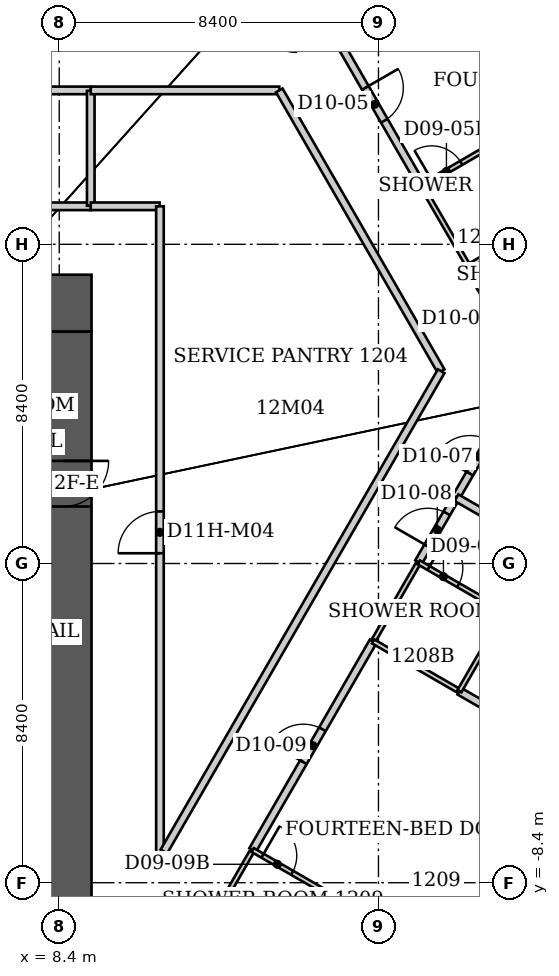
"""IFC4 building model, lengths in metres.
Left out: names, types, materials, properties, quantities, classifications, styles, units other than length and angle.
Written with IfcOpenShell. Run it as: python <this file> out.ifc"""

import sys

from ifc_helpers import new_model, si_unit, direction, frame, frame_2d, origin, origin_2d, place, context, subcontext, project, spatial, rectangle, extrude, clip, halfspace, element, fill, save


model = new_model("IFC4")
c1 = context("Model", 3, precision=1e-05, world=origin(), true_north=direction((0.0, 1.0)))
c2 = subcontext(c1, "Body", "Model", "MODEL_VIEW")
j1 = project(units=[si_unit("LENGTHUNIT", "METRE"), si_unit("PLANEANGLEUNIT", "RADIAN")], contexts=[c1])
p1 = place(None, origin())
s1 = spatial("IfcSite", under=j1, at=p1, CompositionType="ELEMENT")
p2 = place(p1, origin())
s2 = spatial("IfcBuilding", under=s1, at=p2, CompositionType="ELEMENT")
p3 = place(p2, frame((0.0, 0.0, 53.4)))
s3 = spatial("IfcBuildingStorey", under=s2, at=p3, CompositionType="ELEMENT", Elevation=53.4)
p4 = place(p3, frame((20.701, -9.521, 0.0), z_axis=(0.0, 0.0, 1.0), x_axis=(0.866025403784, -0.5, 0.0)))
e1 = element("IfcColumn", 1, at=p4, inside=s3, PredefinedType="COLUMN", context=c2, shape_type="SweptSolid", body=[
    clip(extrude(rectangle(XDim=2.4, YDim=2.4, at=origin_2d()), origin(), (0.0, 0.0, 1.0), 3.752), halfspace(frame((0.0, 0.0, 3.64)), False)),
])
p5 = place(p3, frame((-9.25, 6.85, 0.0), z_axis=(0.0, 0.0, 1.0), x_axis=(1.0, 0.0, 0.0)))
e2 = element("IfcWall", 2, at=p5, inside=s3, PredefinedType="SHEAR", context=c2, shape_type="SweptSolid", body=[
    extrude(rectangle(XDim=18.5, YDim=1.5, at=frame_2d((9.25, 0.0))), origin(), (0.0, 0.0, 1.0), 3.8),
])
p6 = place(p3, frame((8.5, -9.2, 0.0), z_axis=(0.0, 0.0, 1.0), x_axis=(0.0, 1.0, 0.0)))
e3 = element("IfcWall", 3, at=p6, inside=s3, PredefinedType="SHEAR", context=c2, shape_type="SweptSolid", body=[
    extrude(rectangle(XDim=15.3, YDim=1.5, at=frame_2d((7.65, 0.0))), origin(), (0.0, 0.0, 1.0), 3.8),
])
p7 = place(p6, frame((10.7, 0.0, 0.0)))
e4 = element("IfcOpeningElement", 4, at=p7, cuts=e3, PredefinedType="OPENING", context=c2, shape_type="SweptSolid", body=[
    extrude(rectangle(XDim=1.2, YDim=2.2, at=frame_2d((0.6, 1.1))), frame((0.0, 0.75, 0.0), z_axis=(0.0, -1.0, 0.0), x_axis=(1.0, 0.0, 0.0)), (0.0, 0.0, 1.0), 1.5),
])
p8 = place(p3, frame((0.0, 12.45, 0.0), z_axis=(0.0, 0.0, 1.0), x_axis=(1.0, 0.0, 0.0)))
e5 = element("IfcWall", 5, at=p8, inside=s3, PredefinedType="PARTITIONING", context=c2, shape_type="SweptSolid", body=[
    extrude(rectangle(XDim=9.23, YDim=0.2, at=frame_2d((4.615, 0.0))), origin(), (0.0, 0.0, 1.0), 3.64),
])
p9 = place(p8, frame((4.065, 0.0, 0.0)))
e6 = element("IfcOpeningElement", 6, at=p9, cuts=e5, PredefinedType="OPENING", context=c2, shape_type="SweptSolid", body=[
    extrude(rectangle(XDim=1.1, YDim=2.2, at=frame_2d((0.55, 1.1))), frame((0.0, 0.1, 0.0), z_axis=(0.0, -1.0, 0.0), x_axis=(1.0, 0.0, 0.0)), (0.0, 0.0, 1.0), 0.2),
])
p10 = place(p3, frame((9.23, 9.4, 0.0), z_axis=(0.0, 0.0, 1.0), x_axis=(-1.0, 0.0, 0.0)))
e7 = element("IfcWall", 7, at=p10, inside=s3, PredefinedType="PARTITIONING", context=c2, shape_type="SweptSolid", body=[
    extrude(rectangle(XDim=9.23, YDim=0.2, at=frame_2d((4.615, 0.0))), origin(), (0.0, 0.0, 1.0), 3.64),
])
p11 = place(p3, frame((9.23, 12.44, 0.0), z_axis=(0.0, 0.0, 1.0), x_axis=(0.0, -1.0, 0.0)))
e8 = element("IfcWall", 8, at=p11, inside=s3, PredefinedType="PARTITIONING", context=c2, shape_type="SweptSolid", body=[
    extrude(rectangle(XDim=3.025, YDim=0.2, at=frame_2d((1.512, 0.0))), origin(), (0.0, 0.0, 1.0), 3.64),
])
p12 = place(p3, frame((9.23, 12.45, 0.0), z_axis=(0.0, 0.0, 1.0), x_axis=(1.0, 0.0, 0.0)))
e9 = element("IfcWall", 9, at=p12, inside=s3, PredefinedType="PARTITIONING", context=c2, shape_type="SweptSolid", body=[
    extrude(rectangle(XDim=4.96, YDim=0.2, at=frame_2d((2.48, 0.0))), origin(), (0.0, 0.0, 1.0), 3.64),
])
p13 = place(p3, frame((11.04, 9.4, 0.0), z_axis=(0.0, 0.0, 1.0), x_axis=(-1.0, 0.0, 0.0)))
e10 = element("IfcWall", 10, at=p13, inside=s3, PredefinedType="PARTITIONING", context=c2, shape_type="SweptSolid", body=[
    extrude(rectangle(XDim=1.81, YDim=0.2, at=frame_2d((0.905, 0.0))), origin(), (0.0, 0.0, 1.0), 3.64),
])
p14 = place(p3, frame((11.05, -7.76, 0.0), z_axis=(0.0, 0.0, 1.0), x_axis=(0.0, 1.0, 0.0)))
e11 = element("IfcWall", 11, at=p14, inside=s3, PredefinedType="PARTITIONING", context=c2, shape_type="SweptSolid", body=[
    extrude(rectangle(XDim=17.16, YDim=0.2, at=frame_2d((8.58, 0.0))), origin(), (0.0, 0.0, 1.0), 3.64),
])
p15 = place(p14, frame((8.03, 0.0, 0.0)))
e12 = element("IfcOpeningElement", 12, at=p15, cuts=e11, PredefinedType="OPENING", context=c2, shape_type="SweptSolid", body=[
    extrude(rectangle(XDim=1.1, YDim=2.2, at=frame_2d((0.55, 1.1))), frame((0.0, 0.1, 0.0), z_axis=(0.0, -1.0, 0.0), x_axis=(1.0, 0.0, 0.0)), (0.0, 0.0, 1.0), 0.2),
])
p16 = place(p3, frame((12.29, -9.62, 0.0), z_axis=(0.0, 0.0, 1.0), x_axis=(0.499693115345, 0.866202511239, 0.0)))
e13 = element("IfcWall", 13, at=p16, inside=s3, PredefinedType="PARTITIONING", context=c2, shape_type="SweptSolid", body=[
    extrude(rectangle(XDim=2.401, YDim=0.12, at=frame_2d((1.201, 0.0))), origin(), (0.0, 0.0, 1.0), 3.64),
])
p17 = place(p3, frame((13.49, -7.54, 0.0), z_axis=(0.0, 0.0, 1.0), x_axis=(0.500032479136, 0.866006651134, 0.0)))
e14 = element("IfcWall", 14, at=p17, inside=s3, PredefinedType="PARTITIONING", context=c2, shape_type="SweptSolid", body=[
    extrude(rectangle(XDim=6.339, YDim=0.2, at=frame_2d((3.17, 0.0))), origin(), (0.0, 0.0, 1.0), 3.64),
])
p18 = place(p17, frame((2.67, 0.0, 0.0)))
e15 = element("IfcOpeningElement", 15, at=p18, cuts=e14, PredefinedType="OPENING", context=c2, shape_type="SweptSolid", body=[
    extrude(rectangle(XDim=1.0, YDim=2.13, at=frame_2d((0.5, 1.065))), frame((0.0, 0.1, 0.0), z_axis=(0.0, -1.0, 0.0), x_axis=(1.0, 0.0, 0.0)), (0.0, 0.0, 1.0), 0.2),
])
p19 = place(p3, frame((14.19, 12.45, 0.0), z_axis=(0.0, 0.0, 1.0), x_axis=(0.499424260127, -0.866357552282, 0.0)))
e16 = element("IfcWall", 16, at=p19, inside=s3, PredefinedType="PARTITIONING", context=c2, shape_type="SweptSolid", body=[
    extrude(rectangle(XDim=8.53, YDim=0.2, at=frame_2d((4.265, 0.0))), origin(), (0.0, 0.0, 1.0), 3.64),
])
p20 = place(p3, frame((15.467, 14.229, 0.0), z_axis=(0.0, 0.0, 1.0), x_axis=(0.499491884095, -0.866318565958, 0.0)))
e17 = element("IfcWall", 17, at=p20, inside=s3, PredefinedType="PARTITIONING", context=c2, shape_type="SweptSolid", body=[
    extrude(rectangle(XDim=4.95, YDim=0.2, at=frame_2d((2.475, 0.0))), origin(), (0.0, 0.0, 1.0), 3.64),
])
p21 = place(p20, frame((1.975, 0.0, 0.0)))
e18 = element("IfcOpeningElement", 18, at=p21, cuts=e17, PredefinedType="OPENING", context=c2, shape_type="SweptSolid", body=[
    extrude(rectangle(XDim=1.0, YDim=2.13, at=frame_2d((0.5, 1.065))), frame((0.0, 0.1, 0.0), z_axis=(0.0, -1.0, 0.0), x_axis=(1.0, 0.0, 0.0)), (0.0, 0.0, 1.0), 0.2),
])
p22 = place(p3, frame((15.76, -8.85, 0.0), z_axis=(0.0, 0.0, 1.0), x_axis=(-0.866114241029, 0.499846097802, 0.0)))
e19 = element("IfcWall", 19, at=p22, inside=s3, PredefinedType="PARTITIONING", context=c2, shape_type="SweptSolid", body=[
    extrude(rectangle(XDim=2.621, YDim=0.12, at=frame_2d((1.311, 0.0))), origin(), (0.0, 0.0, 1.0), 3.64),
])
p23 = place(p22, frame((1.421, 0.0, 0.0)))
e20 = element("IfcOpeningElement", 20, at=p23, cuts=e19, PredefinedType="OPENING", context=c2, shape_type="SweptSolid", body=[
    extrude(rectangle(XDim=0.9, YDim=2.03, at=frame_2d((0.45, 1.015))), frame((0.0, 0.06, 0.0), z_axis=(0.0, -1.0, 0.0), x_axis=(1.0, 0.0, 0.0)), (0.0, 0.0, 1.0), 0.12),
])
p24 = place(p3, frame((16.66, -2.05, 0.0), z_axis=(0.0, 0.0, 1.0), x_axis=(0.499693115345, 0.866202511239, 0.0)))
e21 = element("IfcWall", 21, at=p24, inside=s3, PredefinedType="PARTITIONING", context=c2, shape_type="SweptSolid", body=[
    extrude(rectangle(XDim=2.401, YDim=0.12, at=frame_2d((1.201, 0.0))), origin(), (0.0, 0.0, 1.0), 3.64),
])
p25 = place(p3, frame((16.66, -2.05, 0.0), z_axis=(0.0, 0.0, 1.0), x_axis=(0.866010296064, -0.500026166427, 0.0)))
e22 = element("IfcWall", 22, at=p25, inside=s3, PredefinedType="PARTITIONING", context=c2, shape_type="SweptSolid", body=[
    extrude(rectangle(XDim=2.621, YDim=0.12, at=frame_2d((1.311, 0.0))), origin(), (0.0, 0.0, 1.0), 3.64),
])
p26 = place(p3, frame((17.854, 0.033, 0.0), z_axis=(0.0, 0.0, 1.0), x_axis=(0.500308553443, 0.865847187067, 0.0)))
e23 = element("IfcWall", 23, at=p26, inside=s3, PredefinedType="PARTITIONING", context=c2, shape_type="SweptSolid", body=[
    extrude(rectangle(XDim=1.971, YDim=0.2, at=frame_2d((0.985, 0.0))), origin(), (0.0, 0.0, 1.0), 3.64),
])
p27 = place(p26, frame((0.485, 0.0, 0.0)))
e24 = element("IfcOpeningElement", 24, at=p27, cuts=e23, PredefinedType="OPENING", context=c2, shape_type="SweptSolid", body=[
    extrude(rectangle(XDim=1.0, YDim=2.13, at=frame_2d((0.5, 1.065))), frame((0.0, 0.1, 0.0), z_axis=(0.0, -1.0, 0.0), x_axis=(1.0, 0.0, 0.0)), (0.0, 0.0, 1.0), 0.2),
])
p28 = place(p3, frame((17.94, 9.94, 0.0), z_axis=(0.0, 0.0, 1.0), x_axis=(0.50162119259, -0.865087382375, 0.0)))
e25 = element("IfcWall", 25, at=p28, inside=s3, PredefinedType="PARTITIONING", context=c2, shape_type="SweptSolid", body=[
    extrude(rectangle(XDim=2.451, YDim=0.12, at=frame_2d((1.226, 0.0))), origin(), (0.0, 0.0, 1.0), 3.64),
])
p29 = place(p3, frame((18.45, 5.06, 0.0), z_axis=(0.0, 0.0, 1.0), x_axis=(-0.499910730718, -0.866076937294, 0.0)))
e26 = element("IfcWall", 26, at=p29, inside=s3, PredefinedType="PARTITIONING", context=c2, shape_type="SweptSolid", body=[
    extrude(rectangle(XDim=14.593, YDim=0.2, at=frame_2d((7.296, 0.0))), origin(), (0.0, 0.0, 1.0), 3.64),
])
p30 = place(p3, frame((18.84, 1.74, 0.0), z_axis=(0.0, 0.0, 1.0), x_axis=(0.501813488763, 0.864975850817, 0.0)))
e27 = element("IfcWall", 27, at=p30, inside=s3, PredefinedType="PARTITIONING", context=c2, shape_type="SweptSolid", body=[
    extrude(rectangle(XDim=2.451, YDim=0.2, at=frame_2d((1.226, 0.0))), origin(), (0.0, 0.0, 1.0), 3.64),
])
p31 = place(p30, frame((0.726, 0.0, 0.0)))
e28 = element("IfcOpeningElement", 28, at=p31, cuts=e27, PredefinedType="OPENING", context=c2, shape_type="SweptSolid", body=[
    extrude(rectangle(XDim=1.0, YDim=2.13, at=frame_2d((0.5, 1.065))), frame((0.0, 0.1, 0.0), z_axis=(0.0, -1.0, 0.0), x_axis=(1.0, 0.0, 0.0)), (0.0, 0.0, 1.0), 0.2),
])
p32 = place(p3, frame((18.93, -3.361, 0.0), z_axis=(0.0, 0.0, 1.0), x_axis=(0.865985044037, -0.500069898618, 0.0)))
e29 = element("IfcWall", 29, at=p32, inside=s3, PredefinedType="PARTITIONING", context=c2, shape_type="SweptSolid", body=[
    extrude(rectangle(XDim=5.758, YDim=0.2, at=frame_2d((2.879, 0.0))), origin(), (0.0, 0.0, 1.0), 3.64),
])
p33 = place(p3, frame((18.93, -3.36, 0.0), z_axis=(0.0, 0.0, 1.0), x_axis=(0.499693115345, 0.866202511239, 0.0)))
e30 = element("IfcWall", 30, at=p33, inside=s3, PredefinedType="PARTITIONING", context=c2, shape_type="SweptSolid", body=[
    extrude(rectangle(XDim=2.401, YDim=0.12, at=frame_2d((1.201, 0.0))), origin(), (0.0, 0.0, 1.0), 3.64),
])
p34 = place(p3, frame((19.17, 7.82, 0.0), z_axis=(0.0, 0.0, 1.0), x_axis=(0.864148586513, 0.503236743916, 0.0)))
e31 = element("IfcWall", 31, at=p34, inside=s3, PredefinedType="PARTITIONING", context=c2, shape_type="SweptSolid", body=[
    extrude(rectangle(XDim=1.053, YDim=0.12, at=frame_2d((0.527, 0.0))), origin(), (0.0, 0.0, 1.0), 3.64),
])
p35 = place(p3, frame((19.169, 7.82, 0.0), z_axis=(0.0, 0.0, 1.0), x_axis=(0.499379570303, -0.866383312838, 0.0)))
e32 = element("IfcWall", 32, at=p35, inside=s3, PredefinedType="PARTITIONING", context=c2, shape_type="SweptSolid", body=[
    extrude(rectangle(XDim=3.185, YDim=0.2, at=frame_2d((1.593, 0.0))), origin(), (0.0, 0.0, 1.0), 3.64),
])
p36 = place(p35, frame((1.093, 0.0, 0.0)))
e33 = element("IfcOpeningElement", 33, at=p36, cuts=e32, PredefinedType="OPENING", context=c2, shape_type="SweptSolid", body=[
    extrude(rectangle(XDim=1.0, YDim=2.13, at=frame_2d((0.5, 1.065))), frame((0.0, 0.1, 0.0), z_axis=(0.0, -1.0, 0.0), x_axis=(1.0, 0.0, 0.0)), (0.0, 0.0, 1.0), 0.2),
])
p37 = place(p3, frame((20.13, -1.28, 0.0), z_axis=(0.0, 0.0, 1.0), x_axis=(-0.866114241029, 0.499846097802, 0.0)))
e34 = element("IfcWall", 34, at=p37, inside=s3, PredefinedType="PARTITIONING", context=c2, shape_type="SweptSolid", body=[
    extrude(rectangle(XDim=2.621, YDim=0.12, at=frame_2d((1.311, 0.0))), origin(), (0.0, 0.0, 1.0), 3.64),
])
p38 = place(p37, frame((1.421, 0.0, 0.0)))
e35 = element("IfcOpeningElement", 35, at=p38, cuts=e34, PredefinedType="OPENING", context=c2, shape_type="SweptSolid", body=[
    extrude(rectangle(XDim=0.9, YDim=2.03, at=frame_2d((0.45, 1.015))), frame((0.0, 0.06, 0.0), z_axis=(0.0, -1.0, 0.0), x_axis=(1.0, 0.0, 0.0)), (0.0, 0.0, 1.0), 0.12),
])
p39 = place(p3, frame((20.25, 11.28, 0.0), z_axis=(0.0, 0.0, 1.0), x_axis=(-0.86498992408, -0.501789229896, 0.0)))
e36 = element("IfcWall", 36, at=p39, inside=s3, PredefinedType="PARTITIONING", context=c2, shape_type="SweptSolid", body=[
    extrude(rectangle(XDim=2.671, YDim=0.12, at=frame_2d((1.335, 0.0))), origin(), (0.0, 0.0, 1.0), 3.64),
])
p40 = place(p39, frame((1.47, 0.0, 0.0)))
e37 = element("IfcOpeningElement", 37, at=p40, cuts=e36, PredefinedType="OPENING", context=c2, shape_type="SweptSolid", body=[
    extrude(rectangle(XDim=0.9, YDim=2.03, at=frame_2d((0.45, 1.015))), frame((0.0, 0.06, 0.0), z_axis=(0.0, -1.0, 0.0), x_axis=(1.0, 0.0, 0.0)), (0.0, 0.0, 1.0), 0.12),
])
p41 = place(p3, frame((26.096, -2.45, 0.0), z_axis=(0.0, 0.0, 1.0), x_axis=(-0.865997946826, 0.500047553832, 0.0)))
e38 = element("IfcWall", 38, at=p41, inside=s3, PredefinedType="PARTITIONING", context=c2, shape_type="SweptSolid", body=[
    extrude(rectangle(XDim=8.364, YDim=0.2, at=frame_2d((4.182, 0.0))), origin(), (0.0, 0.0, 1.0), 3.64),
])
p42 = place(p21, origin())
e39 = element("IfcDoor", 39, at=p42, inside=s3, OperationType="SINGLE_SWING_LEFT", PredefinedType="DOOR", context=c2, shape_type="SweptSolid", body=[
    extrude(rectangle(XDim=1.0, YDim=2.13, at=frame_2d((0.5, 1.065))), frame((0.0, 0.025, 0.0), z_axis=(0.0, -1.0, 0.0), x_axis=(1.0, 0.0, 0.0)), (0.0, 0.0, 1.0), 0.05),
])
fill(e18, e39)
p43 = place(p40, origin())
e40 = element("IfcDoor", 40, at=p43, inside=s3, OperationType="SINGLE_SWING_RIGHT", PredefinedType="DOOR", context=c2, shape_type="SweptSolid", body=[
    extrude(rectangle(XDim=0.9, YDim=2.03, at=frame_2d((0.45, 1.015))), frame((0.0, 0.025, 0.0), z_axis=(0.0, -1.0, 0.0), x_axis=(1.0, 0.0, 0.0)), (0.0, 0.0, 1.0), 0.05),
])
fill(e37, e40)
p44 = place(p31, origin())
e41 = element("IfcDoor", 41, at=p44, inside=s3, OperationType="SINGLE_SWING_LEFT", PredefinedType="DOOR", context=c2, shape_type="SweptSolid", body=[
    extrude(rectangle(XDim=1.0, YDim=2.13, at=frame_2d((0.5, 1.065))), frame((0.0, 0.025, 0.0), z_axis=(0.0, -1.0, 0.0), x_axis=(1.0, 0.0, 0.0)), (0.0, 0.0, 1.0), 0.05),
])
fill(e28, e41)
p45 = place(p27, origin())
e42 = element("IfcDoor", 42, at=p45, inside=s3, OperationType="SINGLE_SWING_LEFT", PredefinedType="DOOR", context=c2, shape_type="SweptSolid", body=[
    extrude(rectangle(XDim=1.0, YDim=2.13, at=frame_2d((0.5, 1.065))), frame((0.0, 0.025, 0.0), z_axis=(0.0, -1.0, 0.0), x_axis=(1.0, 0.0, 0.0)), (0.0, 0.0, 1.0), 0.05),
])
fill(e24, e42)
p46 = place(p38, origin())
e43 = element("IfcDoor", 43, at=p46, inside=s3, OperationType="SINGLE_SWING_RIGHT", PredefinedType="DOOR", context=c2, shape_type="SweptSolid", body=[
    extrude(rectangle(XDim=0.9, YDim=2.03, at=frame_2d((0.45, 1.015))), frame((0.0, 0.025, 0.0), z_axis=(0.0, -1.0, 0.0), x_axis=(1.0, 0.0, 0.0)), (0.0, 0.0, 1.0), 0.05),
])
fill(e35, e43)
p47 = place(p18, origin())
e44 = element("IfcDoor", 44, at=p47, inside=s3, OperationType="SINGLE_SWING_LEFT", PredefinedType="DOOR", context=c2, shape_type="SweptSolid", body=[
    extrude(rectangle(XDim=1.0, YDim=2.13, at=frame_2d((0.5, 1.065))), frame((0.0, 0.025, 0.0), z_axis=(0.0, -1.0, 0.0), x_axis=(1.0, 0.0, 0.0)), (0.0, 0.0, 1.0), 0.05),
])
fill(e15, e44)
p48 = place(p23, origin())
e45 = element("IfcDoor", 45, at=p48, inside=s3, OperationType="SINGLE_SWING_RIGHT", PredefinedType="DOOR", context=c2, shape_type="SweptSolid", body=[
    extrude(rectangle(XDim=0.9, YDim=2.03, at=frame_2d((0.45, 1.015))), frame((0.0, 0.025, 0.0), z_axis=(0.0, -1.0, 0.0), x_axis=(1.0, 0.0, 0.0)), (0.0, 0.0, 1.0), 0.05),
])
fill(e20, e45)
p49 = place(p15, origin())
e46 = element("IfcDoor", 46, at=p49, inside=s3, OperationType="SINGLE_SWING_LEFT", PredefinedType="DOOR", context=c2, shape_type="SweptSolid", body=[
    extrude(rectangle(XDim=1.1, YDim=2.2, at=frame_2d((0.55, 1.1))), frame((0.0, 0.025, 0.0), z_axis=(0.0, -1.0, 0.0), x_axis=(1.0, 0.0, 0.0)), (0.0, 0.0, 1.0), 0.05),
])
fill(e12, e46)
p50 = place(p7, origin())
e47 = element("IfcDoor", 47, at=p50, inside=s3, OperationType="SINGLE_SWING_RIGHT", PredefinedType="DOOR", context=c2, shape_type="SweptSolid", body=[
    extrude(rectangle(XDim=1.2, YDim=2.2, at=frame_2d((0.6, 1.1))), frame((0.0, 0.025, 0.0), z_axis=(0.0, -1.0, 0.0), x_axis=(1.0, 0.0, 0.0)), (0.0, 0.0, 1.0), 0.05),
])
fill(e4, e47)
save(model, sys.argv[1])
